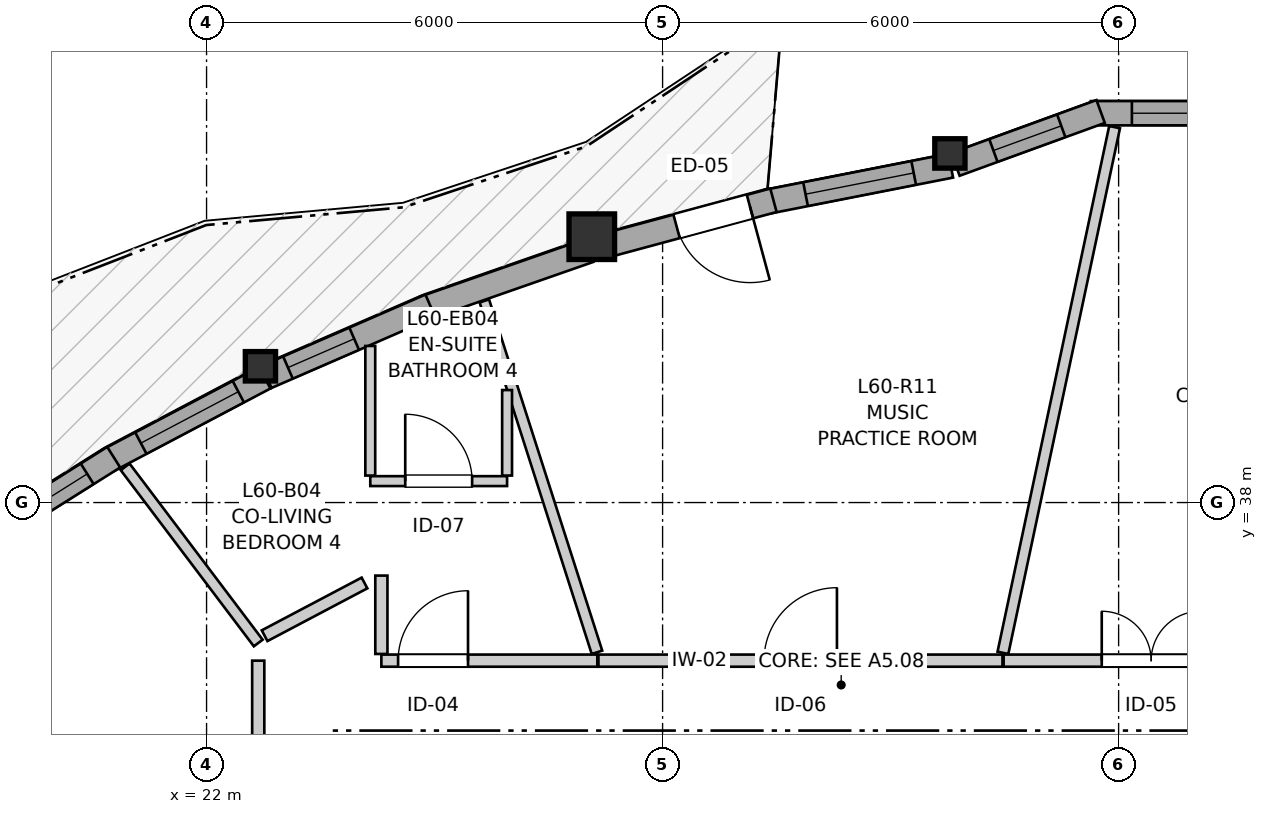
"""IFC4 building model, lengths in metres.
Left out: names, types, materials, properties, quantities, classifications, styles, units other than length and angle.
Written with IfcOpenShell. Run it as: python <this file> out.ifc"""

import sys

from ifc_helpers import new_model, si_unit, direction, frame, frame_2d, origin, origin_2d, place, context, subcontext, project, spatial, rectangle, i_section, extrude, source, transform, mapped, element, fill, save


model = new_model("IFC4")
c1 = context("Model", 3, precision=1e-05, world=origin(), true_north=direction((0.0, 1.0)))
c2 = subcontext(c1, "Body", "Model", "MODEL_VIEW")
j1 = project(units=[si_unit("LENGTHUNIT", "METRE"), si_unit("PLANEANGLEUNIT", "RADIAN")], contexts=[c1])
p1 = place(None, origin())
s1 = spatial("IfcSite", under=j1, at=p1, CompositionType="ELEMENT")
p2 = place(p1, origin())
s2 = spatial("IfcBuilding", under=s1, at=p2, CompositionType="ELEMENT")
p3 = place(p2, frame((0.0, 0.0, 202.0)))
s3 = spatial("IfcBuildingStorey", under=s2, at=p3, CompositionType="ELEMENT", Elevation=202.0)
m1 = source(origin(), c2, "Body", "SweptSolid", [
    extrude(i_section(OverallWidth=0.398, OverallDepth=0.387, WebThickness=0.019, FlangeThickness=0.03, FilletRadius=0.015, at=origin_2d()), origin(), (0.0, 0.0, 1.0), 2.935),
])
p4 = place(p3, frame((31.78, 42.593, 0.0), z_axis=(0.0, 0.0, 1.0), x_axis=(1.0, 0.0, 0.0)))
e1 = element("IfcColumn", 1, at=p4, inside=s3, PredefinedType="PILASTER", context=c2, shape_type="MappedRepresentation", body=[
    mapped(m1, transform((0.0, 0.0, 0.0), x_axis=(1.0, 0.0, 0.0), y_axis=(0.0, 1.0, 0.0), z_axis=(0.0, 0.0, 1.0), scale=1.0)),
])
m2 = source(origin(), c2, "Body", "SweptSolid", [
    extrude(rectangle(XDim=0.6, YDim=0.6, at=origin_2d()), origin(), (0.0, 0.0, 1.0), 2.935),
])
p5 = place(p3, frame((27.069, 41.498, 0.0), z_axis=(0.0, 0.0, 1.0), x_axis=(1.0, 0.0, 0.0)))
e2 = element("IfcColumn", 2, at=p5, inside=s3, PredefinedType="COLUMN", context=c2, shape_type="MappedRepresentation", body=[
    mapped(m2, transform((0.0, 0.0, 0.0), x_axis=(1.0, 0.0, 0.0), y_axis=(0.0, 1.0, 0.0), z_axis=(0.0, 0.0, 1.0), scale=1.0)),
])
p6 = place(p3, frame((22.709, 39.793, 0.0), z_axis=(0.0, 0.0, 1.0), x_axis=(1.0, 0.0, 0.0)))
e3 = element("IfcColumn", 3, at=p6, inside=s3, PredefinedType="PILASTER", context=c2, shape_type="MappedRepresentation", body=[
    mapped(m1, transform((0.0, 0.0, 0.0), x_axis=(1.0, 0.0, 0.0), y_axis=(0.0, 1.0, 0.0), z_axis=(0.0, 0.0, 1.0), scale=1.0)),
])
p7 = place(p3, frame((35.725, 43.122, 0.0), z_axis=(0.0, 0.0, 1.0), x_axis=(-1.0, 0.0, 0.0)))
e4 = element("IfcWall", 4, at=p7, inside=s3, PredefinedType="SOLIDWALL", context=c2, shape_type="SweptSolid", body=[
    extrude(rectangle(XDim=2.09, YDim=0.32, at=frame_2d((1.045, 0.0))), origin(), (0.0, 0.0, 1.0), 2.555),
])
p8 = place(p7, frame((0.301, 0.0, 0.82)))
e5 = element("IfcOpeningElement", 5, at=p8, cuts=e4, PredefinedType="OPENING", context=c2, shape_type="SweptSolid", body=[
    extrude(rectangle(XDim=1.25, YDim=1.35, at=frame_2d((0.625, 0.675))), frame((0.0, 0.17, 0.0), z_axis=(0.0, -1.0, 0.0), x_axis=(1.0, 0.0, 0.0)), (0.0, 0.0, 1.0), 0.34),
])
p9 = place(p3, frame((33.763, 43.145, 0.0), z_axis=(0.0, 0.0, 1.0), x_axis=(-0.939691662178, -0.342022777067, 0.0)))
e6 = element("IfcWall", 6, at=p9, inside=s3, PredefinedType="SOLIDWALL", context=c2, shape_type="SweptSolid", body=[
    extrude(rectangle(XDim=2.032, YDim=0.32, at=frame_2d((1.016, 0.0))), origin(), (0.0, 0.0, 1.0), 2.555),
])
p10 = place(p9, frame((0.551, 0.0, 0.82)))
e7 = element("IfcOpeningElement", 7, at=p10, cuts=e6, PredefinedType="OPENING", context=c2, shape_type="SweptSolid", body=[
    extrude(rectangle(XDim=0.95, YDim=1.35, at=frame_2d((0.475, 0.675))), frame((0.0, 0.17, 0.0), z_axis=(0.0, -1.0, 0.0), x_axis=(1.0, 0.0, 0.0)), (0.0, 0.0, 1.0), 0.34),
])
p11 = place(p3, frame((31.791, 42.432, 0.0), z_axis=(0.0, 0.0, 1.0), x_axis=(-0.981230743763, -0.192837308358, 0.0)))
e8 = element("IfcWall", 8, at=p11, inside=s3, PredefinedType="SOLIDWALL", context=c2, shape_type="SweptSolid", body=[
    extrude(rectangle(XDim=2.464, YDim=0.32, at=frame_2d((1.232, 0.0))), origin(), (0.0, 0.0, 1.0), 2.555),
])
p12 = place(p11, frame((0.497, 0.0, 0.82)))
e9 = element("IfcOpeningElement", 9, at=p12, cuts=e8, PredefinedType="OPENING", context=c2, shape_type="SweptSolid", body=[
    extrude(rectangle(XDim=1.45, YDim=1.25, at=frame_2d((0.725, 0.625))), frame((0.0, 0.17, 0.0), z_axis=(0.0, -1.0, 0.0), x_axis=(1.0, 0.0, 0.0)), (0.0, 0.0, 1.0), 0.34),
])
p13 = place(p3, frame((29.459, 41.977, 0.0), z_axis=(0.0, 0.0, 1.0), x_axis=(-0.965462644558, -0.260541516774, 0.0)))
e10 = element("IfcWall", 10, at=p13, inside=s3, PredefinedType="SOLIDWALL", context=c2, shape_type="SweptSolid", body=[
    extrude(rectangle(XDim=2.343, YDim=0.32, at=frame_2d((1.171, 0.0))), origin(), (0.0, 0.0, 1.0), 2.555),
])
p14 = place(p13, frame((0.32, 0.0, 0.0)))
e11 = element("IfcOpeningElement", 11, at=p14, cuts=e10, PredefinedType="OPENING", context=c2, shape_type="SweptSolid", body=[
    extrude(rectangle(XDim=1.0, YDim=2.1, at=frame_2d((0.5, 1.05))), frame((0.0, 0.17, 0.0), z_axis=(0.0, -1.0, 0.0), x_axis=(1.0, 0.0, 0.0)), (0.0, 0.0, 1.0), 0.34),
])
p15 = place(p3, frame((27.036, 41.317, 0.0), z_axis=(0.0, 0.0, 1.0), x_axis=(-0.944115832513, -0.329613857108, 0.0)))
e12 = element("IfcWall", 12, at=p15, inside=s3, PredefinedType="SOLIDWALL", context=c2, shape_type="SweptSolid", body=[
    extrude(rectangle(XDim=2.303, YDim=0.32, at=frame_2d((1.152, 0.0))), origin(), (0.0, 0.0, 1.0), 2.555),
])
p16 = place(p3, frame((24.943, 40.59, 0.0), z_axis=(0.0, 0.0, 1.0), x_axis=(-0.917071710038, -0.398722307688, 0.0)))
e13 = element("IfcWall", 13, at=p16, inside=s3, PredefinedType="SOLIDWALL", context=c2, shape_type="SweptSolid", body=[
    extrude(rectangle(XDim=2.347, YDim=0.32, at=frame_2d((1.173, 0.0))), origin(), (0.0, 0.0, 1.0), 2.555),
])
p17 = place(p16, frame((1.091, 0.0, 0.82)))
e14 = element("IfcOpeningElement", 14, at=p17, cuts=e13, PredefinedType="OPENING", context=c2, shape_type="SweptSolid", body=[
    extrude(rectangle(XDim=0.95, YDim=1.35, at=frame_2d((0.475, 0.675))), frame((0.0, 0.17, 0.0), z_axis=(0.0, -1.0, 0.0), x_axis=(1.0, 0.0, 0.0)), (0.0, 0.0, 1.0), 0.34),
])
p18 = place(p3, frame((22.766, 39.642, 0.0), z_axis=(0.0, 0.0, 1.0), x_axis=(-0.884377555637, -0.466772256122, 0.0)))
e15 = element("IfcWall", 15, at=p18, inside=s3, PredefinedType="SOLIDWALL", context=c2, shape_type="SweptSolid", body=[
    extrude(rectangle(XDim=2.334, YDim=0.32, at=frame_2d((1.167, 0.0))), origin(), (0.0, 0.0, 1.0), 2.555),
])
p19 = place(p18, frame((0.393, 0.0, 0.82)))
e16 = element("IfcOpeningElement", 16, at=p19, cuts=e15, PredefinedType="OPENING", context=c2, shape_type="SweptSolid", body=[
    extrude(rectangle(XDim=1.45, YDim=1.25, at=frame_2d((0.725, 0.625))), frame((0.0, 0.17, 0.0), z_axis=(0.0, -1.0, 0.0), x_axis=(1.0, 0.0, 0.0)), (0.0, 0.0, 1.0), 0.34),
])
p20 = place(p3, frame((20.778, 38.597, 0.0), z_axis=(0.0, 0.0, 1.0), x_axis=(-0.84639489148, -0.532555807101, 0.0)))
e17 = element("IfcWall", 17, at=p20, inside=s3, PredefinedType="SOLIDWALL", context=c2, shape_type="SweptSolid", body=[
    extrude(rectangle(XDim=2.264, YDim=0.32, at=frame_2d((1.132, 0.0))), origin(), (0.0, 0.0, 1.0), 2.555),
])
p21 = place(p20, frame((0.412, 0.0, 0.82)))
e18 = element("IfcOpeningElement", 18, at=p21, cuts=e17, PredefinedType="OPENING", context=c2, shape_type="SweptSolid", body=[
    extrude(rectangle(XDim=1.45, YDim=1.25, at=frame_2d((0.725, 0.625))), frame((0.0, 0.17, 0.0), z_axis=(0.0, -1.0, 0.0), x_axis=(1.0, 0.0, 0.0)), (0.0, 0.0, 1.0), 0.34),
])
p22 = place(p3, frame((27.156, 35.92, 0.0), z_axis=(0.0, 0.0, 1.0), x_axis=(1.0, 0.0, 0.0)))
e19 = element("IfcWall", 19, at=p22, inside=s3, PredefinedType="PARTITIONING", context=c2, shape_type="SweptSolid", body=[
    extrude(rectangle(XDim=5.316, YDim=0.16, at=frame_2d((2.658, 0.0))), origin(), (0.0, 0.0, 1.0), 2.603),
])
p23 = place(p22, frame((2.178, 0.0, 0.0)))
e20 = element("IfcOpeningElement", 20, at=p23, cuts=e19, PredefinedType="OPENING", context=c2, shape_type="SweptSolid", body=[
    extrude(rectangle(XDim=0.96, YDim=2.1, at=frame_2d((0.48, 1.05))), frame((0.0, 0.09, 0.0), z_axis=(0.0, -1.0, 0.0), x_axis=(1.0, 0.0, 0.0)), (0.0, 0.0, 1.0), 0.18),
])
p24 = place(p3, frame((32.487, 35.92, 0.0), z_axis=(0.0, 0.0, 1.0), x_axis=(1.0, 0.0, 0.0)))
e21 = element("IfcWall", 21, at=p24, inside=s3, PredefinedType="PARTITIONING", context=c2, shape_type="SweptSolid", body=[
    extrude(rectangle(XDim=3.913, YDim=0.16, at=frame_2d((1.957, 0.0))), origin(), (0.0, 0.0, 1.0), 2.935),
])
p25 = place(p24, frame((1.291, 0.0, 0.0)))
e22 = element("IfcOpeningElement", 22, at=p25, cuts=e21, PredefinedType="OPENING", context=c2, shape_type="SweptSolid", body=[
    extrude(rectangle(XDim=1.3, YDim=2.1, at=frame_2d((0.65, 1.05))), frame((0.0, 0.09, 0.0), z_axis=(0.0, -1.0, 0.0), x_axis=(1.0, 0.0, 0.0)), (0.0, 0.0, 1.0), 0.18),
])
p26 = place(p3, frame((24.3, 35.92, 0.0), z_axis=(0.0, 0.0, 1.0), x_axis=(1.0, 0.0, 0.0)))
e23 = element("IfcWall", 23, at=p26, inside=s3, PredefinedType="PARTITIONING", context=c2, shape_type="SweptSolid", body=[
    extrude(rectangle(XDim=2.841, YDim=0.16, at=frame_2d((1.42, 0.0))), origin(), (0.0, 0.0, 1.0), 2.935),
])
p27 = place(p26, frame((0.22, 0.0, 0.0)))
e24 = element("IfcOpeningElement", 24, at=p27, cuts=e23, PredefinedType="OPENING", context=c2, shape_type="SweptSolid", body=[
    extrude(rectangle(XDim=0.92, YDim=2.1, at=frame_2d((0.46, 1.05))), frame((0.0, 0.09, 0.0), z_axis=(0.0, -1.0, 0.0), x_axis=(1.0, 0.0, 0.0)), (0.0, 0.0, 1.0), 0.18),
])
p28 = place(p3, frame((24.154, 38.282, 0.0), z_axis=(0.0, 0.0, 1.0), x_axis=(1.0, 0.0, 0.0)))
e25 = element("IfcWall", 25, at=p28, inside=s3, PredefinedType="PARTITIONING", context=c2, shape_type="SweptSolid", body=[
    extrude(rectangle(XDim=1.8, YDim=0.13, at=frame_2d((0.9, 0.0))), origin(), (0.0, 0.0, 1.0), 2.935),
])
p29 = place(p28, frame((0.46, 0.0, 0.0)))
e26 = element("IfcOpeningElement", 26, at=p29, cuts=e25, PredefinedType="OPENING", context=c2, shape_type="SweptSolid", body=[
    extrude(rectangle(XDim=0.88, YDim=2.05, at=frame_2d((0.44, 1.025))), frame((0.0, 0.075, 0.0), z_axis=(0.0, -1.0, 0.0), x_axis=(1.0, 0.0, 0.0)), (0.0, 0.0, 1.0), 0.15),
])
p30 = place(p3, frame((32.478, 36.023, 0.0), z_axis=(0.0, 0.0, 1.0), x_axis=(0.207795571792, 0.978172275391, 0.0)))
e27 = element("IfcWall", 27, at=p30, inside=s3, PredefinedType="PARTITIONING", context=c2, shape_type="SweptSolid", body=[
    extrude(rectangle(XDim=7.071, YDim=0.145, at=frame_2d((3.535, 0.0))), origin(), (0.0, 0.0, 1.0), 2.935),
])
p31 = place(p3, frame((25.939, 39.767, 0.0), z_axis=(0.0, 0.0, 1.0), x_axis=(0.305195538028, -0.952289705693, 0.0)))
e28 = element("IfcWall", 28, at=p31, inside=s3, PredefinedType="PARTITIONING", context=c2, shape_type="SweptSolid", body=[
    extrude(rectangle(XDim=3.925, YDim=0.145, at=frame_2d((1.962, 0.0))), origin(), (0.0, 0.0, 1.0), 2.935),
])
p32 = place(p3, frame((20.929, 38.469, 0.0), z_axis=(0.0, 0.0, 1.0), x_axis=(0.602847358209, -0.797856542682, 0.0)))
e29 = element("IfcWall", 29, at=p32, inside=s3, PredefinedType="PARTITIONING", context=c2, shape_type="SweptSolid", body=[
    extrude(rectangle(XDim=2.905, YDim=0.145, at=frame_2d((1.452, 0.0))), origin(), (0.0, 0.0, 1.0), 2.935),
])
p33 = place(p3, frame((24.154, 38.355, 0.0), z_axis=(0.0, 0.0, 1.0), x_axis=(0.0, 1.0, 0.0)))
e30 = element("IfcWall", 30, at=p33, inside=s3, PredefinedType="PARTITIONING", context=c2, shape_type="SweptSolid", body=[
    extrude(rectangle(XDim=1.705, YDim=0.13, at=frame_2d((0.853, 0.0))), origin(), (0.0, 0.0, 1.0), 2.935),
])
p34 = place(p3, frame((22.68, 34.315, 0.0), z_axis=(0.0, 0.0, 1.0), x_axis=(0.0, 1.0, 0.0)))
e31 = element("IfcWall", 31, at=p34, inside=s3, PredefinedType="PARTITIONING", context=c2, shape_type="SweptSolid", body=[
    extrude(rectangle(XDim=1.605, YDim=0.16, at=frame_2d((0.802, 0.0))), origin(), (0.0, 0.0, 1.0), 2.935),
])
p35 = place(p3, frame((22.764, 36.248, 0.0), z_axis=(0.0, 0.0, 1.0), x_axis=(0.884318813942, 0.466883535059, 0.0)))
e32 = element("IfcWall", 32, at=p35, inside=s3, PredefinedType="PARTITIONING", context=c2, shape_type="SweptSolid", body=[
    extrude(rectangle(XDim=1.486, YDim=0.16, at=frame_2d((0.743, 0.0))), origin(), (0.0, 0.0, 1.0), 2.935),
])
p36 = place(p3, frame((25.954, 38.355, 0.0), z_axis=(0.0, 0.0, 1.0), x_axis=(0.0, 1.0, 0.0)))
e33 = element("IfcWall", 33, at=p36, inside=s3, PredefinedType="PARTITIONING", context=c2, shape_type="SweptSolid", body=[
    extrude(rectangle(XDim=1.125, YDim=0.13, at=frame_2d((0.562, 0.0))), origin(), (0.0, 0.0, 1.0), 2.935),
])
p37 = place(p3, frame((24.3, 36.008, 0.0), z_axis=(0.0, 0.0, 1.0), x_axis=(0.0, 1.0, 0.0)))
e34 = element("IfcWall", 34, at=p37, inside=s3, PredefinedType="PARTITIONING", context=c2, shape_type="SweptSolid", body=[
    extrude(rectangle(XDim=1.031, YDim=0.16, at=frame_2d((0.516, 0.0))), origin(), (0.0, 0.0, 1.0), 2.935),
])
p38 = place(p3, frame((25.655, 40.652, 0.0), z_axis=(0.0, 0.0, 1.0), x_axis=(0.305317972149, -0.952250458589, 0.0)))
e35 = element("IfcWall", 35, at=p38, inside=s3, PredefinedType="PARTITIONING", context=c2, shape_type="SweptSolid", body=[
    extrude(rectangle(XDim=0.915, YDim=0.13, at=frame_2d((0.458, 0.0))), origin(), (0.0, 0.0, 1.0), 2.935),
])
m3 = source(origin(), c2, "Body", "SweptSolid", [
    extrude(rectangle(XDim=1.25, YDim=1.35, at=frame_2d((0.625, 0.675))), frame((0.0, 0.03, 0.0), z_axis=(0.0, -1.0, 0.0), x_axis=(1.0, 0.0, 0.0)), (0.0, 0.0, 1.0), 0.06),
])
p39 = place(p8, origin())
e36 = element("IfcWindow", 36, at=p39, inside=s3, PartitioningType="SINGLE_PANEL", PredefinedType="WINDOW", context=c2, shape_type="MappedRepresentation", body=[
    mapped(m3, transform((0.0, 0.0, 0.0), x_axis=(1.0, 0.0, 0.0), y_axis=(0.0, 1.0, 0.0), z_axis=(0.0, 0.0, 1.0), scale=1.0)),
])
fill(e5, e36)
m4 = source(origin(), c2, "Body", "SweptSolid", [
    extrude(rectangle(XDim=0.95, YDim=1.35, at=frame_2d((0.475, 0.675))), frame((0.0, 0.03, 0.0), z_axis=(0.0, -1.0, 0.0), x_axis=(1.0, 0.0, 0.0)), (0.0, 0.0, 1.0), 0.06),
])
p40 = place(p10, origin())
e37 = element("IfcWindow", 37, at=p40, inside=s3, PartitioningType="SINGLE_PANEL", PredefinedType="WINDOW", context=c2, shape_type="MappedRepresentation", body=[
    mapped(m4, transform((0.0, 0.0, 0.0), x_axis=(1.0, 0.0, 0.0), y_axis=(0.0, 1.0, 0.0), z_axis=(0.0, 0.0, 1.0), scale=1.0)),
])
fill(e7, e37)
m5 = source(origin(), c2, "Body", "SweptSolid", [
    extrude(rectangle(XDim=1.45, YDim=1.25, at=frame_2d((0.725, 0.625))), frame((0.0, 0.03, 0.0), z_axis=(0.0, -1.0, 0.0), x_axis=(1.0, 0.0, 0.0)), (0.0, 0.0, 1.0), 0.06),
])
p41 = place(p12, origin())
e38 = element("IfcWindow", 38, at=p41, inside=s3, PartitioningType="SINGLE_PANEL", PredefinedType="WINDOW", context=c2, shape_type="MappedRepresentation", body=[
    mapped(m5, transform((0.0, 0.0, 0.0), x_axis=(1.0, 0.0, 0.0), y_axis=(0.0, 1.0, 0.0), z_axis=(0.0, 0.0, 1.0), scale=1.0)),
])
fill(e9, e38)
p42 = place(p17, origin())
e39 = element("IfcWindow", 39, at=p42, inside=s3, PartitioningType="SINGLE_PANEL", PredefinedType="WINDOW", context=c2, shape_type="MappedRepresentation", body=[
    mapped(m4, transform((0.0, 0.0, 0.0), x_axis=(1.0, 0.0, 0.0), y_axis=(0.0, 1.0, 0.0), z_axis=(0.0, 0.0, 1.0), scale=1.0)),
])
fill(e14, e39)
p43 = place(p19, origin())
e40 = element("IfcWindow", 40, at=p43, inside=s3, PartitioningType="SINGLE_PANEL", PredefinedType="WINDOW", context=c2, shape_type="MappedRepresentation", body=[
    mapped(m5, transform((0.0, 0.0, 0.0), x_axis=(1.0, 0.0, 0.0), y_axis=(0.0, 1.0, 0.0), z_axis=(0.0, 0.0, 1.0), scale=1.0)),
])
fill(e16, e40)
p44 = place(p21, origin())
e41 = element("IfcWindow", 41, at=p44, inside=s3, PartitioningType="SINGLE_PANEL", PredefinedType="WINDOW", context=c2, shape_type="MappedRepresentation", body=[
    mapped(m5, transform((0.0, 0.0, 0.0), x_axis=(1.0, 0.0, 0.0), y_axis=(0.0, 1.0, 0.0), z_axis=(0.0, 0.0, 1.0), scale=1.0)),
])
fill(e18, e41)
m6 = source(origin(), c2, "Body", "SweptSolid", [
    extrude(rectangle(XDim=1.0, YDim=2.1, at=frame_2d((0.5, 1.05))), frame((0.0, 0.025, 0.0), z_axis=(0.0, -1.0, 0.0), x_axis=(1.0, 0.0, 0.0)), (0.0, 0.0, 1.0), 0.05),
])
p45 = place(p14, origin())
e42 = element("IfcDoor", 42, at=p45, inside=s3, OperationType="SINGLE_SWING_LEFT", PredefinedType="DOOR", context=c2, shape_type="MappedRepresentation", body=[
    mapped(m6, transform((0.0, 0.0, 0.0), x_axis=(1.0, 0.0, 0.0), y_axis=(0.0, 1.0, 0.0), z_axis=(0.0, 0.0, 1.0), scale=1.0)),
])
fill(e11, e42)
m7 = source(origin(), c2, "Body", "SweptSolid", [
    extrude(rectangle(XDim=0.96, YDim=2.1, at=frame_2d((0.48, 1.05))), frame((0.0, 0.025, 0.0), z_axis=(0.0, -1.0, 0.0), x_axis=(1.0, 0.0, 0.0)), (0.0, 0.0, 1.0), 0.05),
])
p46 = place(p23, origin())
e43 = element("IfcDoor", 43, at=p46, inside=s3, OperationType="SINGLE_SWING_RIGHT", PredefinedType="DOOR", context=c2, shape_type="MappedRepresentation", body=[
    mapped(m7, transform((0.0, 0.0, 0.0), x_axis=(1.0, 0.0, 0.0), y_axis=(0.0, 1.0, 0.0), z_axis=(0.0, 0.0, 1.0), scale=1.0)),
])
fill(e20, e43)
m8 = source(origin(), c2, "Body", "SweptSolid", [
    extrude(rectangle(XDim=1.3, YDim=2.1, at=frame_2d((0.65, 1.05))), frame((0.0, 0.025, 0.0), z_axis=(0.0, -1.0, 0.0), x_axis=(1.0, 0.0, 0.0)), (0.0, 0.0, 1.0), 0.05),
])
p47 = place(p25, origin())
e44 = element("IfcDoor", 44, at=p47, inside=s3, OperationType="DOUBLE_DOOR_SINGLE_SWING", PredefinedType="DOOR", context=c2, shape_type="MappedRepresentation", body=[
    mapped(m8, transform((0.0, 0.0, 0.0), x_axis=(1.0, 0.0, 0.0), y_axis=(0.0, 1.0, 0.0), z_axis=(0.0, 0.0, 1.0), scale=1.0)),
])
fill(e22, e44)
m9 = source(origin(), c2, "Body", "SweptSolid", [
    extrude(rectangle(XDim=0.92, YDim=2.1, at=frame_2d((0.46, 1.05))), frame((0.0, 0.025, 0.0), z_axis=(0.0, -1.0, 0.0), x_axis=(1.0, 0.0, 0.0)), (0.0, 0.0, 1.0), 0.05),
])
p48 = place(p27, origin())
e45 = element("IfcDoor", 45, at=p48, inside=s3, OperationType="SINGLE_SWING_RIGHT", PredefinedType="DOOR", context=c2, shape_type="MappedRepresentation", body=[
    mapped(m9, transform((0.0, 0.0, 0.0), x_axis=(1.0, 0.0, 0.0), y_axis=(0.0, 1.0, 0.0), z_axis=(0.0, 0.0, 1.0), scale=1.0)),
])
fill(e24, e45)
m10 = source(origin(), c2, "Body", "SweptSolid", [
    extrude(rectangle(XDim=0.88, YDim=2.05, at=frame_2d((0.44, 1.025))), frame((0.0, 0.025, 0.0), z_axis=(0.0, -1.0, 0.0), x_axis=(1.0, 0.0, 0.0)), (0.0, 0.0, 1.0), 0.05),
])
p49 = place(p29, origin())
e46 = element("IfcDoor", 46, at=p49, inside=s3, OperationType="SINGLE_SWING_LEFT", PredefinedType="DOOR", context=c2, shape_type="MappedRepresentation", body=[
    mapped(m10, transform((0.0, 0.0, 0.0), x_axis=(1.0, 0.0, 0.0), y_axis=(0.0, 1.0, 0.0), z_axis=(0.0, 0.0, 1.0), scale=1.0)),
])
fill(e26, e46)
save(model, sys.argv[1])
